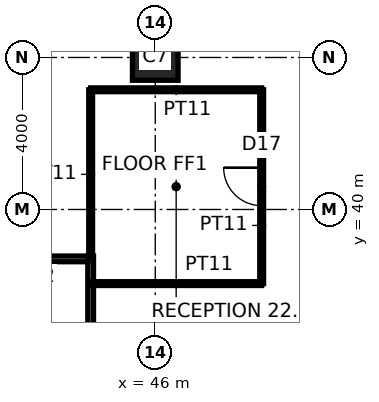
"""IFC4 building model, lengths in metres.
Left out: names, types, materials, properties, quantities, classifications, styles, units other than length and angle.
Written with IfcOpenShell. Run it as: python <this file> out.ifc"""

import sys

from ifc_helpers import new_model, si_unit, direction, frame, frame_2d, origin, origin_2d, place, context, subcontext, project, spatial, rectangle, hollow_rectangle, extrude, element, fill, save


model = new_model("IFC4")
c1 = context("Model", 3, precision=1e-05, world=origin(), true_north=direction((0.0, 1.0)))
c2 = subcontext(c1, "Body", "Model", "MODEL_VIEW")
j1 = project(units=[si_unit("LENGTHUNIT", "METRE"), si_unit("PLANEANGLEUNIT", "RADIAN")], contexts=[c1])
p1 = place(None, origin())
s1 = spatial("IfcSite", under=j1, at=p1, CompositionType="ELEMENT")
p2 = place(p1, origin())
s2 = spatial("IfcBuilding", under=s1, at=p2, CompositionType="ELEMENT")
p3 = place(p2, frame((0.0, 0.0, 47.0)))
s3 = spatial("IfcBuildingStorey", under=s2, at=p3, CompositionType="ELEMENT", Elevation=47.0)
p4 = place(p3, frame((46.0, 44.0, 0.0), z_axis=(0.0, 0.0, 1.0), x_axis=(1.0, 0.0, 0.0)))
e1 = element("IfcColumn", 1, at=p4, inside=s3, PredefinedType="COLUMN", context=c2, shape_type="SweptSolid", body=[
    extrude(hollow_rectangle(XDim=1.2, YDim=1.2, WallThickness=0.1, at=origin_2d()), origin(), (0.0, 0.0, 1.0), 4.0),
])
p5 = place(p3, frame((44.3, 15.225, 0.0), z_axis=(0.0, 0.0, 1.0), x_axis=(0.0, 1.0, 0.0)))
e2 = element("IfcWall", 2, at=p5, inside=s3, PredefinedType="PARTITIONING", context=c2, shape_type="SweptSolid", body=[
    extrude(rectangle(XDim=23.55, YDim=0.15, at=frame_2d((11.775, 0.0))), origin(), (0.0, 0.0, 1.0), 3.85),
])
p6 = place(p5, frame((7.175, 0.0, 0.0)))
e3 = element("IfcOpeningElement", 3, at=p6, cuts=e2, PredefinedType="OPENING", context=c2, shape_type="SweptSolid", body=[
    extrude(rectangle(XDim=1.8, YDim=2.4, at=frame_2d((0.9, 1.2))), frame((0.0, 0.085, 0.0), z_axis=(0.0, -1.0, 0.0), x_axis=(1.0, 0.0, 0.0)), (0.0, 0.0, 1.0), 0.17),
])
p7 = place(p5, frame((18.175, 0.0, 0.0)))
e4 = element("IfcOpeningElement", 4, at=p7, cuts=e2, PredefinedType="OPENING", context=c2, shape_type="SweptSolid", body=[
    extrude(rectangle(XDim=1.8, YDim=2.4, at=frame_2d((0.9, 1.2))), frame((0.0, 0.085, 0.0), z_axis=(0.0, -1.0, 0.0), x_axis=(1.0, 0.0, 0.0)), (0.0, 0.0, 1.0), 0.17),
])
p8 = place(p3, frame((15.175, 38.7, 0.0), z_axis=(0.0, 0.0, 1.0), x_axis=(1.0, 0.0, 0.0)))
e5 = element("IfcWall", 5, at=p8, inside=s3, PredefinedType="PARTITIONING", context=c2, shape_type="SweptSolid", body=[
    extrude(rectangle(XDim=29.05, YDim=0.15, at=frame_2d((14.525, 0.0))), origin(), (0.0, 0.0, 1.0), 3.85),
])
p9 = place(p8, frame((8.575, 0.0, 0.0)))
e6 = element("IfcOpeningElement", 6, at=p9, cuts=e5, PredefinedType="OPENING", context=c2, shape_type="SweptSolid", body=[
    extrude(rectangle(XDim=0.9, YDim=2.1, at=frame_2d((0.45, 1.05))), frame((0.0, 0.085, 0.0), z_axis=(0.0, -1.0, 0.0), x_axis=(1.0, 0.0, 0.0)), (0.0, 0.0, 1.0), 0.17),
])
p10 = place(p8, frame((12.325, 0.0, 0.0)))
e7 = element("IfcOpeningElement", 7, at=p10, cuts=e5, PredefinedType="OPENING", context=c2, shape_type="SweptSolid", body=[
    extrude(rectangle(XDim=1.0, YDim=2.1, at=frame_2d((0.5, 1.05))), frame((0.0, 0.085, 0.0), z_axis=(0.0, -1.0, 0.0), x_axis=(1.0, 0.0, 0.0)), (0.0, 0.0, 1.0), 0.17),
])
p11 = place(p8, frame((16.175, 0.0, 0.0)))
e8 = element("IfcOpeningElement", 8, at=p11, cuts=e5, PredefinedType="OPENING", context=c2, shape_type="SweptSolid", body=[
    extrude(rectangle(XDim=0.9, YDim=2.1, at=frame_2d((0.45, 1.05))), frame((0.0, 0.085, 0.0), z_axis=(0.0, -1.0, 0.0), x_axis=(1.0, 0.0, 0.0)), (0.0, 0.0, 1.0), 0.17),
])
p12 = place(p3, frame((44.3, 38.05, 0.0), z_axis=(0.0, 0.0, 1.0), x_axis=(1.0, 0.0, 0.0)))
e9 = element("IfcWall", 9, at=p12, inside=s3, PredefinedType="PARTITIONING", context=c2, shape_type="SweptSolid", body=[
    extrude(rectangle(XDim=4.5, YDim=0.1, at=frame_2d((2.25, 0.0))), origin(), (0.0, 0.0, 1.0), 3.85),
])
p13 = place(p3, frame((48.8, 38.05, 0.0), z_axis=(0.0, 0.0, 1.0), x_axis=(0.0, 1.0, 0.0)))
e10 = element("IfcWall", 10, at=p13, inside=s3, PredefinedType="PARTITIONING", context=c2, shape_type="SweptSolid", body=[
    extrude(rectangle(XDim=5.1, YDim=0.1, at=frame_2d((2.55, 0.0))), origin(), (0.0, 0.0, 1.0), 3.85),
])
p14 = place(p13, frame((2.05, 0.0, 0.0)))
e11 = element("IfcOpeningElement", 11, at=p14, cuts=e10, PredefinedType="OPENING", context=c2, shape_type="SweptSolid", body=[
    extrude(rectangle(XDim=1.0, YDim=2.2, at=frame_2d((0.5, 1.1))), frame((0.0, 0.06, 0.0), z_axis=(0.0, -1.0, 0.0), x_axis=(1.0, 0.0, 0.0)), (0.0, 0.0, 1.0), 0.12),
])
p15 = place(p3, frame((48.8, 43.15, 0.0), z_axis=(0.0, 0.0, 1.0), x_axis=(-1.0, 0.0, 0.0)))
e12 = element("IfcWall", 12, at=p15, inside=s3, PredefinedType="PARTITIONING", context=c2, shape_type="SweptSolid", body=[
    extrude(rectangle(XDim=4.5, YDim=0.1, at=frame_2d((2.25, 0.0))), origin(), (0.0, 0.0, 1.0), 3.85),
])
p16 = place(p3, frame((44.3, 43.15, 0.0), z_axis=(0.0, 0.0, 1.0), x_axis=(0.0, -1.0, 0.0)))
e13 = element("IfcWall", 13, at=p16, inside=s3, PredefinedType="PARTITIONING", context=c2, shape_type="SweptSolid", body=[
    extrude(rectangle(XDim=4.45, YDim=0.1, at=frame_2d((2.225, 0.0))), origin(), (0.0, 0.0, 1.0), 3.85),
])
p17 = place(p14, origin())
e14 = element("IfcDoor", 14, at=p17, inside=s3, OperationType="SINGLE_SWING_RIGHT", PredefinedType="DOOR", context=c2, shape_type="SweptSolid", body=[
    extrude(rectangle(XDim=1.0, YDim=2.2, at=frame_2d((0.5, 1.1))), frame((0.0, 0.025, 0.0), z_axis=(0.0, -1.0, 0.0), x_axis=(1.0, 0.0, 0.0)), (0.0, 0.0, 1.0), 0.05),
])
fill(e11, e14)
save(model, sys.argv[1])
